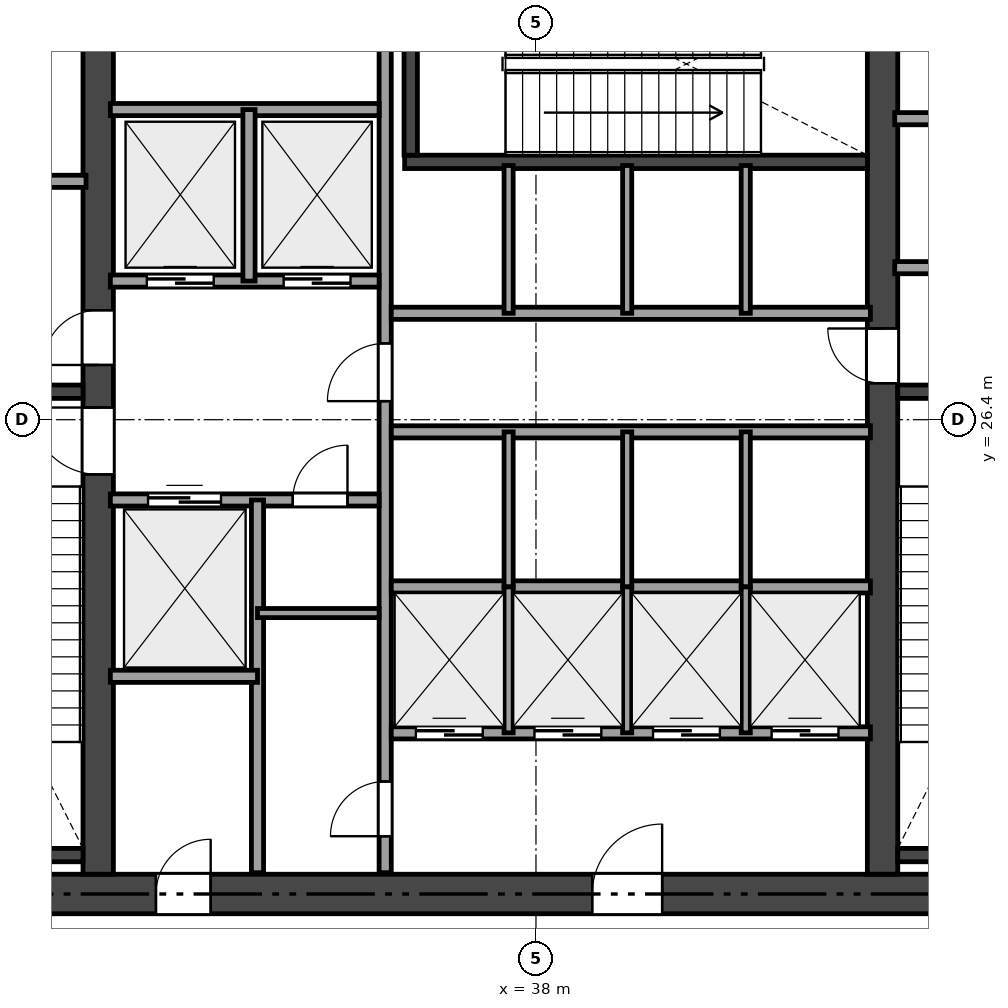
"""IFC4 building model, lengths in metres.
Left out: names, types, materials, properties, quantities, classifications, styles, units other than length and angle.
Written with IfcOpenShell. Run it as: python <this file> out.ifc"""

import sys

from ifc_helpers import new_model, si_unit, direction, frame, frame_2d, origin, place, context, subcontext, project, spatial, rectangle, extrude, element, fill, save


model = new_model("IFC4")
c1 = context("Model", 3, precision=1e-05, world=origin(), true_north=direction((0.0, 1.0)))
c2 = subcontext(c1, "Body", "Model", "MODEL_VIEW")
j1 = project(units=[si_unit("LENGTHUNIT", "METRE"), si_unit("PLANEANGLEUNIT", "RADIAN")], contexts=[c1])
p1 = place(None, origin())
s1 = spatial("IfcSite", under=j1, at=p1, CompositionType="ELEMENT")
p2 = place(p1, origin())
s2 = spatial("IfcBuilding", under=s1, at=p2, CompositionType="ELEMENT")
p3 = place(p2, frame((0.0, 0.0, 21.6)))
s3 = spatial("IfcBuildingStorey", under=s2, at=p3, CompositionType="ELEMENT", Elevation=21.6)
p4 = place(p3, frame((26.475, 18.6, 0.0), z_axis=(0.0, 0.0, 1.0), x_axis=(1.0, 0.0, 0.0)))
e1 = element("IfcWall", 1, at=p4, inside=s3, PredefinedType="SHEAR", context=c2, shape_type="SweptSolid", body=[
    extrude(rectangle(XDim=21.45, YDim=0.65, at=frame_2d((10.725, 0.0))), origin(), (0.0, 0.0, 1.0), 4.98),
])
p5 = place(p4, frame((12.45, 0.0, 0.0)))
e2 = element("IfcOpeningElement", 2, at=p5, cuts=e1, PredefinedType="OPENING", context=c2, shape_type="SweptSolid", body=[
    extrude(rectangle(XDim=1.15, YDim=2.15, at=frame_2d((0.575, 1.075))), frame((0.0, 0.335, 0.0), z_axis=(0.0, -1.0, 0.0), x_axis=(1.0, 0.0, 0.0)), (0.0, 0.0, 1.0), 0.67),
])
p6 = place(p4, frame((5.275, 0.0, 0.0)))
e3 = element("IfcOpeningElement", 3, at=p6, cuts=e1, PredefinedType="OPENING", context=c2, shape_type="SweptSolid", body=[
    extrude(rectangle(XDim=0.9, YDim=2.1, at=frame_2d((0.45, 1.05))), frame((0.0, 0.335, 0.0), z_axis=(0.0, -1.0, 0.0), x_axis=(1.0, 0.0, 0.0)), (0.0, 0.0, 1.0), 0.67),
])
p7 = place(p3, frame((30.8, 18.925, 0.0), z_axis=(0.0, 0.0, 1.0), x_axis=(0.0, 1.0, 0.0)))
e4 = element("IfcWall", 4, at=p7, inside=s3, PredefinedType="SHEAR", context=c2, shape_type="SweptSolid", body=[
    extrude(rectangle(XDim=14.95, YDim=0.5, at=frame_2d((7.475, 0.0))), origin(), (0.0, 0.0, 1.0), 4.98),
])
p8 = place(p7, frame((6.575, 0.0, 0.0)))
e5 = element("IfcOpeningElement", 5, at=p8, cuts=e4, PredefinedType="OPENING", context=c2, shape_type="SweptSolid", body=[
    extrude(rectangle(XDim=1.1, YDim=2.15, at=frame_2d((0.55, 1.075))), frame((0.0, 0.26, 0.0), z_axis=(0.0, -1.0, 0.0), x_axis=(1.0, 0.0, 0.0)), (0.0, 0.0, 1.0), 0.52),
])
p9 = place(p7, frame((8.375, 0.0, 0.0)))
e6 = element("IfcOpeningElement", 6, at=p9, cuts=e4, PredefinedType="OPENING", context=c2, shape_type="SweptSolid", body=[
    extrude(rectangle(XDim=0.9, YDim=2.1, at=frame_2d((0.45, 1.05))), frame((0.0, 0.26, 0.0), z_axis=(0.0, -1.0, 0.0), x_axis=(1.0, 0.0, 0.0)), (0.0, 0.0, 1.0), 0.52),
])
p10 = place(p3, frame((43.7, 18.925, 0.0), z_axis=(0.0, 0.0, 1.0), x_axis=(0.0, 1.0, 0.0)))
e7 = element("IfcWall", 7, at=p10, inside=s3, PredefinedType="SHEAR", context=c2, shape_type="SweptSolid", body=[
    extrude(rectangle(XDim=14.95, YDim=0.5, at=frame_2d((7.475, 0.0))), origin(), (0.0, 0.0, 1.0), 4.98),
])
p11 = place(p10, frame((8.075, 0.0, 0.0)))
e8 = element("IfcOpeningElement", 8, at=p11, cuts=e7, PredefinedType="OPENING", context=c2, shape_type="SweptSolid", body=[
    extrude(rectangle(XDim=0.9, YDim=2.1, at=frame_2d((0.45, 1.05))), frame((0.0, 0.26, 0.0), z_axis=(0.0, -1.0, 0.0), x_axis=(1.0, 0.0, 0.0)), (0.0, 0.0, 1.0), 0.52),
])
for number, where, z_axis, x_axis in (
    (9, (27.125, 26.86, 0.0), (0.0, 0.0, 1.0), (1.0, 0.0, 0.0)),
    (10, (27.125, 19.24, 0.0), (0.0, 0.0, 1.0), (1.0, 0.0, 0.0)),
):
    element("IfcWall", number, at=place(p3, frame(where, z_axis=z_axis, x_axis=x_axis)), inside=s3, PredefinedType="SHEAR", context=c2, shape_type="SweptSolid", body=[
        extrude(rectangle(XDim=3.425, YDim=0.22, at=frame_2d((1.712, 0.0))), origin(), (0.0, 0.0, 1.0), 4.98),
    ])
for number, where, z_axis, x_axis in (
    (11, (43.95, 26.86, 0.0), (0.0, 0.0, 1.0), (1.0, 0.0, 0.0)),
    (12, (43.95, 19.24, 0.0), (0.0, 0.0, 1.0), (1.0, 0.0, 0.0)),
):
    element("IfcWall", number, at=place(p3, frame(where, z_axis=z_axis, x_axis=x_axis)), inside=s3, PredefinedType="SHEAR", context=c2, shape_type="SweptSolid", body=[
        extrude(rectangle(XDim=3.325, YDim=0.22, at=frame_2d((1.663, 0.0))), origin(), (0.0, 0.0, 1.0), 4.98),
    ])
p12 = place(p3, frame((35.84, 30.64, 0.0), z_axis=(0.0, 0.0, 1.0), x_axis=(1.0, 0.0, 0.0)))
e13 = element("IfcWall", 13, at=p12, inside=s3, PredefinedType="SHEAR", context=c2, shape_type="SweptSolid", body=[
    extrude(rectangle(XDim=7.61, YDim=0.22, at=frame_2d((3.805, 0.0))), origin(), (0.0, 0.0, 1.0), 4.98),
])
p13 = place(p3, frame((35.94, 30.75, 0.0), z_axis=(0.0, 0.0, 1.0), x_axis=(0.0, 1.0, 0.0)))
e14 = element("IfcWall", 14, at=p13, inside=s3, PredefinedType="SHEAR", context=c2, shape_type="SweptSolid", body=[
    extrude(rectangle(XDim=3.125, YDim=0.22, at=frame_2d((1.562, 0.0))), origin(), (0.0, 0.0, 1.0), 4.98),
])
p14 = place(p3, frame((27.15, 30.32, 0.0), z_axis=(0.0, 0.0, 1.0), x_axis=(1.0, 0.0, 0.0)))
e15 = element("IfcWall", 15, at=p14, inside=s3, PredefinedType="SOLIDWALL", context=c2, shape_type="SweptSolid", body=[
    extrude(rectangle(XDim=3.45, YDim=0.2, at=frame_2d((1.725, 0.0))), origin(), (0.0, 0.0, 1.0), 4.98),
])
p15 = place(p3, frame((43.9, 28.9, 0.0), z_axis=(0.0, 0.0, 1.0), x_axis=(1.0, 0.0, 0.0)))
e16 = element("IfcWall", 16, at=p15, inside=s3, PredefinedType="SOLIDWALL", context=c2, shape_type="SweptSolid", body=[
    extrude(rectangle(XDim=3.35, YDim=0.2, at=frame_2d((1.675, 0.0))), origin(), (0.0, 0.0, 1.0), 4.98),
])
p16 = place(p15, frame((1.15, 0.0, 0.0)))
e17 = element("IfcOpeningElement", 17, at=p16, cuts=e16, PredefinedType="OPENING", context=c2, shape_type="SweptSolid", body=[
    extrude(rectangle(XDim=0.9, YDim=2.1, at=frame_2d((0.45, 1.05))), frame((0.0, 0.11, 0.0), z_axis=(0.0, -1.0, 0.0), x_axis=(1.0, 0.0, 0.0)), (0.0, 0.0, 1.0), 0.22),
])
p17 = place(p3, frame((43.9, 31.35, 0.0), z_axis=(0.0, 0.0, 1.0), x_axis=(1.0, 0.0, 0.0)))
e18 = element("IfcWall", 18, at=p17, inside=s3, PredefinedType="SOLIDWALL", context=c2, shape_type="SweptSolid", body=[
    extrude(rectangle(XDim=3.35, YDim=0.2, at=frame_2d((1.675, 0.0))), origin(), (0.0, 0.0, 1.0), 4.98),
])
p18 = place(p3, frame((35.52, 18.95, 0.0), z_axis=(0.0, 0.0, 1.0), x_axis=(0.0, 1.0, 0.0)))
e19 = element("IfcWall", 19, at=p18, inside=s3, PredefinedType="SOLIDWALL", context=c2, shape_type="SweptSolid", body=[
    extrude(rectangle(XDim=14.9, YDim=0.2, at=frame_2d((7.45, 0.0))), origin(), (0.0, 0.0, 1.0), 4.501),
])
p19 = place(p18, frame((7.755, 0.0, 0.0)))
e20 = element("IfcOpeningElement", 20, at=p19, cuts=e19, PredefinedType="OPENING", context=c2, shape_type="SweptSolid", body=[
    extrude(rectangle(XDim=0.95, YDim=2.15, at=frame_2d((0.475, 1.075))), frame((0.0, 0.11, 0.0), z_axis=(0.0, -1.0, 0.0), x_axis=(1.0, 0.0, 0.0)), (0.0, 0.0, 1.0), 0.22),
])
p20 = place(p18, frame((0.6, 0.0, 0.0)))
e21 = element("IfcOpeningElement", 21, at=p20, cuts=e19, PredefinedType="OPENING", context=c2, shape_type="SweptSolid", body=[
    extrude(rectangle(XDim=0.9, YDim=2.1, at=frame_2d((0.45, 1.05))), frame((0.0, 0.11, 0.0), z_axis=(0.0, -1.0, 0.0), x_axis=(1.0, 0.0, 0.0)), (0.0, 0.0, 1.0), 0.22),
])
p21 = place(p3, frame((31.0, 28.68, 0.0), z_axis=(0.0, 0.0, 1.0), x_axis=(1.0, 0.0, 0.0)))
e22 = element("IfcWall", 22, at=p21, inside=s3, PredefinedType="SOLIDWALL", context=c2, shape_type="SweptSolid", body=[
    extrude(rectangle(XDim=4.42, YDim=0.2, at=frame_2d((2.21, 0.0))), origin(), (0.0, 0.0, 1.0), 4.98),
])
p22 = place(p21, frame((0.6, 0.0, 0.0)))
e23 = element("IfcOpeningElement", 23, at=p22, cuts=e22, PredefinedType="OPENING", context=c2, shape_type="SweptSolid", body=[
    extrude(rectangle(XDim=1.1, YDim=2.15, at=frame_2d((0.55, 1.075))), frame((0.0, 0.11, 0.0), z_axis=(0.0, -1.0, 0.0), x_axis=(1.0, 0.0, 0.0)), (0.0, 0.0, 1.0), 0.22),
])
p23 = place(p21, frame((2.85, 0.0, 0.0)))
e24 = element("IfcOpeningElement", 24, at=p23, cuts=e22, PredefinedType="OPENING", context=c2, shape_type="SweptSolid", body=[
    extrude(rectangle(XDim=1.1, YDim=2.15, at=frame_2d((0.55, 1.075))), frame((0.0, 0.11, 0.0), z_axis=(0.0, -1.0, 0.0), x_axis=(1.0, 0.0, 0.0)), (0.0, 0.0, 1.0), 0.22),
])
p24 = place(p3, frame((31.0, 31.5, 0.0), z_axis=(0.0, 0.0, 1.0), x_axis=(1.0, 0.0, 0.0)))
e25 = element("IfcWall", 25, at=p24, inside=s3, PredefinedType="SOLIDWALL", context=c2, shape_type="SweptSolid", body=[
    extrude(rectangle(XDim=4.42, YDim=0.2, at=frame_2d((2.21, 0.0))), origin(), (0.0, 0.0, 1.0), 4.98),
])
p25 = place(p3, frame((33.28, 28.68, 0.0), z_axis=(0.0, 0.0, 1.0), x_axis=(0.0, 1.0, 0.0)))
e26 = element("IfcWall", 26, at=p25, inside=s3, PredefinedType="SOLIDWALL", context=c2, shape_type="SweptSolid", body=[
    extrude(rectangle(XDim=2.82, YDim=0.2, at=frame_2d((1.41, 0.0))), origin(), (0.0, 0.0, 1.0), 4.98),
])
p26 = place(p3, frame((31.0, 25.08, 0.0), z_axis=(0.0, 0.0, 1.0), x_axis=(1.0, 0.0, 0.0)))
e27 = element("IfcWall", 27, at=p26, inside=s3, PredefinedType="SOLIDWALL", context=c2, shape_type="SweptSolid", body=[
    extrude(rectangle(XDim=4.42, YDim=0.2, at=frame_2d((2.21, 0.0))), origin(), (0.0, 0.0, 1.0), 4.98),
])
p27 = place(p26, frame((3.0, 0.0, 0.0)))
e28 = element("IfcOpeningElement", 28, at=p27, cuts=e27, PredefinedType="OPENING", context=c2, shape_type="SweptSolid", body=[
    extrude(rectangle(XDim=0.9, YDim=2.1, at=frame_2d((0.45, 1.05))), frame((0.0, 0.11, 0.0), z_axis=(0.0, -1.0, 0.0), x_axis=(1.0, 0.0, 0.0)), (0.0, 0.0, 1.0), 0.22),
])
p28 = place(p26, frame((0.62, 0.0, 0.0)))
e29 = element("IfcOpeningElement", 29, at=p28, cuts=e27, PredefinedType="OPENING", context=c2, shape_type="SweptSolid", body=[
    extrude(rectangle(XDim=1.2, YDim=2.15, at=frame_2d((0.6, 1.075))), frame((0.0, 0.11, 0.0), z_axis=(0.0, -1.0, 0.0), x_axis=(1.0, 0.0, 0.0)), (0.0, 0.0, 1.0), 0.22),
])
p29 = place(p3, frame((33.42, 18.95, 0.0), z_axis=(0.0, 0.0, 1.0), x_axis=(0.0, 1.0, 0.0)))
e30 = element("IfcWall", 30, at=p29, inside=s3, PredefinedType="SOLIDWALL", context=c2, shape_type="SweptSolid", body=[
    extrude(rectangle(XDim=6.13, YDim=0.2, at=frame_2d((3.065, 0.0))), origin(), (0.0, 0.0, 1.0), 4.501),
])
p30 = place(p3, frame((31.0, 22.18, 0.0), z_axis=(0.0, 0.0, 1.0), x_axis=(1.0, 0.0, 0.0)))
e31 = element("IfcWall", 31, at=p30, inside=s3, PredefinedType="SOLIDWALL", context=c2, shape_type="SweptSolid", body=[
    extrude(rectangle(XDim=2.42, YDim=0.2, at=frame_2d((1.21, 0.0))), origin(), (0.0, 0.0, 1.0), 4.98),
])
p31 = place(p3, frame((33.42, 23.22, 0.0), z_axis=(0.0, 0.0, 1.0), x_axis=(1.0, 0.0, 0.0)))
e32 = element("IfcWall", 32, at=p31, inside=s3, PredefinedType="PARTITIONING", context=c2, shape_type="SweptSolid", body=[
    extrude(rectangle(XDim=2.0, YDim=0.15, at=frame_2d((1.0, 0.0))), origin(), (0.0, 0.0, 1.0), 4.98),
])
for number, where, z_axis, x_axis in (
    (33, (35.62, 28.15, 0.0), (0.0, 0.0, 1.0), (1.0, 0.0, 0.0)),
    (34, (35.62, 26.2, 0.0), (0.0, 0.0, 1.0), (1.0, 0.0, 0.0)),
):
    element("IfcWall", number, at=place(p3, frame(where, z_axis=z_axis, x_axis=x_axis)), inside=s3, PredefinedType="SOLIDWALL", context=c2, shape_type="SweptSolid", body=[
        extrude(rectangle(XDim=7.88, YDim=0.2, at=frame_2d((3.94, 0.0))), origin(), (0.0, 0.0, 1.0), 4.98),
    ])
p32 = place(p3, frame((35.62, 23.65, 0.0), z_axis=(0.0, 0.0, 1.0), x_axis=(1.0, 0.0, 0.0)))
e35 = element("IfcWall", 35, at=p32, inside=s3, PredefinedType="SOLIDWALL", context=c2, shape_type="SweptSolid", body=[
    extrude(rectangle(XDim=7.88, YDim=0.2, at=frame_2d((3.94, 0.0))), origin(), (0.0, 0.0, 1.0), 4.501),
])
p33 = place(p3, frame((35.62, 21.25, 0.0), z_axis=(0.0, 0.0, 1.0), x_axis=(1.0, 0.0, 0.0)))
e36 = element("IfcWall", 36, at=p33, inside=s3, PredefinedType="SOLIDWALL", context=c2, shape_type="SweptSolid", body=[
    extrude(rectangle(XDim=7.88, YDim=0.2, at=frame_2d((3.94, 0.0))), origin(), (0.0, 0.0, 1.0), 4.98),
])
p34 = place(p33, frame((0.405, 0.0, 0.0)))
e37 = element("IfcOpeningElement", 37, at=p34, cuts=e36, PredefinedType="OPENING", context=c2, shape_type="SweptSolid", body=[
    extrude(rectangle(XDim=1.1, YDim=2.15, at=frame_2d((0.55, 1.075))), frame((0.0, 0.11, 0.0), z_axis=(0.0, -1.0, 0.0), x_axis=(1.0, 0.0, 0.0)), (0.0, 0.0, 1.0), 0.22),
])
p35 = place(p33, frame((2.355, 0.0, 0.0)))
e38 = element("IfcOpeningElement", 38, at=p35, cuts=e36, PredefinedType="OPENING", context=c2, shape_type="SweptSolid", body=[
    extrude(rectangle(XDim=1.1, YDim=2.15, at=frame_2d((0.55, 1.075))), frame((0.0, 0.11, 0.0), z_axis=(0.0, -1.0, 0.0), x_axis=(1.0, 0.0, 0.0)), (0.0, 0.0, 1.0), 0.22),
])
p36 = place(p33, frame((4.305, 0.0, 0.0)))
e39 = element("IfcOpeningElement", 39, at=p36, cuts=e36, PredefinedType="OPENING", context=c2, shape_type="SweptSolid", body=[
    extrude(rectangle(XDim=1.1, YDim=2.15, at=frame_2d((0.55, 1.075))), frame((0.0, 0.11, 0.0), z_axis=(0.0, -1.0, 0.0), x_axis=(1.0, 0.0, 0.0)), (0.0, 0.0, 1.0), 0.22),
])
p37 = place(p33, frame((6.255, 0.0, 0.0)))
e40 = element("IfcOpeningElement", 40, at=p37, cuts=e36, PredefinedType="OPENING", context=c2, shape_type="SweptSolid", body=[
    extrude(rectangle(XDim=1.1, YDim=2.15, at=frame_2d((0.55, 1.075))), frame((0.0, 0.11, 0.0), z_axis=(0.0, -1.0, 0.0), x_axis=(1.0, 0.0, 0.0)), (0.0, 0.0, 1.0), 0.22),
])
for number, where, z_axis, x_axis in (
    (41, (37.55, 28.15, 0.0), (0.0, 0.0, 1.0), (0.0, 1.0, 0.0)),
    (42, (39.5, 28.15, 0.0), (0.0, 0.0, 1.0), (0.0, 1.0, 0.0)),
    (43, (41.45, 28.15, 0.0), (0.0, 0.0, 1.0), (0.0, 1.0, 0.0)),
):
    element("IfcWall", number, at=place(p3, frame(where, z_axis=z_axis, x_axis=x_axis)), inside=s3, PredefinedType="PARTITIONING", context=c2, shape_type="SweptSolid", body=[
        extrude(rectangle(XDim=2.43, YDim=0.15, at=frame_2d((1.215, 0.0))), origin(), (0.0, 0.0, 1.0), 4.98),
    ])
for number, where, z_axis, x_axis in (
    (44, (37.55, 23.65, 0.0), (0.0, 0.0, 1.0), (0.0, 1.0, 0.0)),
    (45, (39.5, 23.65, 0.0), (0.0, 0.0, 1.0), (0.0, 1.0, 0.0)),
    (46, (41.45, 23.65, 0.0), (0.0, 0.0, 1.0), (0.0, 1.0, 0.0)),
):
    element("IfcWall", number, at=place(p3, frame(where, z_axis=z_axis, x_axis=x_axis)), inside=s3, PredefinedType="PARTITIONING", context=c2, shape_type="SweptSolid", body=[
        extrude(rectangle(XDim=2.55, YDim=0.15, at=frame_2d((1.275, 0.0))), origin(), (0.0, 0.0, 1.0), 4.501),
    ])
for number, where, z_axis, x_axis in (
    (47, (37.55, 21.25, 0.0), (0.0, 0.0, 1.0), (0.0, 1.0, 0.0)),
    (48, (39.5, 21.25, 0.0), (0.0, 0.0, 1.0), (0.0, 1.0, 0.0)),
    (49, (41.45, 21.25, 0.0), (0.0, 0.0, 1.0), (0.0, 1.0, 0.0)),
):
    element("IfcWall", number, at=place(p3, frame(where, z_axis=z_axis, x_axis=x_axis)), inside=s3, PredefinedType="PARTITIONING", context=c2, shape_type="SweptSolid", body=[
        extrude(rectangle(XDim=2.4, YDim=0.15, at=frame_2d((1.2, 0.0))), origin(), (0.0, 0.0, 1.0), 4.501),
    ])
p38 = place(p8, origin())
e50 = element("IfcDoor", 50, at=p38, inside=s3, OperationType="SINGLE_SWING_RIGHT", PredefinedType="DOOR", context=c2, shape_type="SweptSolid", body=[
    extrude(rectangle(XDim=1.1, YDim=2.15, at=frame_2d((0.55, 1.075))), frame((0.0, 0.025, 0.0), z_axis=(0.0, -1.0, 0.0), x_axis=(1.0, 0.0, 0.0)), (0.0, 0.0, 1.0), 0.05),
])
fill(e5, e50)
p39 = place(p19, origin())
e51 = element("IfcDoor", 51, at=p39, inside=s3, OperationType="SINGLE_SWING_LEFT", PredefinedType="DOOR", context=c2, shape_type="SweptSolid", body=[
    extrude(rectangle(XDim=0.95, YDim=2.15, at=frame_2d((0.475, 1.075))), frame((0.0, 0.025, 0.0), z_axis=(0.0, -1.0, 0.0), x_axis=(1.0, 0.0, 0.0)), (0.0, 0.0, 1.0), 0.05),
])
fill(e20, e51)
p40 = place(p11, origin())
e52 = element("IfcDoor", 52, at=p40, inside=s3, OperationType="SINGLE_SWING_RIGHT", PredefinedType="DOOR", context=c2, shape_type="SweptSolid", body=[
    extrude(rectangle(XDim=0.9, YDim=2.1, at=frame_2d((0.45, 1.05))), frame((0.0, 0.025, 0.0), z_axis=(0.0, -1.0, 0.0), x_axis=(1.0, 0.0, 0.0)), (0.0, 0.0, 1.0), 0.05),
])
fill(e8, e52)
p41 = place(p5, origin())
e53 = element("IfcDoor", 53, at=p41, inside=s3, OperationType="SINGLE_SWING_RIGHT", PredefinedType="DOOR", context=c2, shape_type="SweptSolid", body=[
    extrude(rectangle(XDim=1.15, YDim=2.15, at=frame_2d((0.575, 1.075))), frame((0.0, 0.025, 0.0), z_axis=(0.0, -1.0, 0.0), x_axis=(1.0, 0.0, 0.0)), (0.0, 0.0, 1.0), 0.05),
])
fill(e2, e53)
p42 = place(p9, origin())
e54 = element("IfcDoor", 54, at=p42, inside=s3, OperationType="SINGLE_SWING_LEFT", PredefinedType="DOOR", context=c2, shape_type="SweptSolid", body=[
    extrude(rectangle(XDim=0.9, YDim=2.1, at=frame_2d((0.45, 1.05))), frame((0.0, 0.025, 0.0), z_axis=(0.0, -1.0, 0.0), x_axis=(1.0, 0.0, 0.0)), (0.0, 0.0, 1.0), 0.05),
])
fill(e6, e54)
p43 = place(p6, origin())
e55 = element("IfcDoor", 55, at=p43, inside=s3, OperationType="SINGLE_SWING_RIGHT", PredefinedType="DOOR", context=c2, shape_type="SweptSolid", body=[
    extrude(rectangle(XDim=0.9, YDim=2.1, at=frame_2d((0.45, 1.05))), frame((0.0, 0.025, 0.0), z_axis=(0.0, -1.0, 0.0), x_axis=(1.0, 0.0, 0.0)), (0.0, 0.0, 1.0), 0.05),
])
fill(e3, e55)
p44 = place(p20, origin())
e56 = element("IfcDoor", 56, at=p44, inside=s3, OperationType="SINGLE_SWING_LEFT", PredefinedType="DOOR", context=c2, shape_type="SweptSolid", body=[
    extrude(rectangle(XDim=0.9, YDim=2.1, at=frame_2d((0.45, 1.05))), frame((0.0, 0.025, 0.0), z_axis=(0.0, -1.0, 0.0), x_axis=(1.0, 0.0, 0.0)), (0.0, 0.0, 1.0), 0.05),
])
fill(e21, e56)
p45 = place(p27, origin())
e57 = element("IfcDoor", 57, at=p45, inside=s3, OperationType="SINGLE_SWING_RIGHT", PredefinedType="DOOR", context=c2, shape_type="SweptSolid", body=[
    extrude(rectangle(XDim=0.9, YDim=2.1, at=frame_2d((0.45, 1.05))), frame((0.0, 0.025, 0.0), z_axis=(0.0, -1.0, 0.0), x_axis=(1.0, 0.0, 0.0)), (0.0, 0.0, 1.0), 0.05),
])
fill(e28, e57)
p46 = place(p22, origin())
e58 = element("IfcDoor", 58, at=p46, inside=s3, OperationType="SLIDING_TO_LEFT", PredefinedType="DOOR", context=c2, shape_type="SweptSolid", body=[
    extrude(rectangle(XDim=1.1, YDim=2.15, at=frame_2d((0.55, 1.075))), frame((0.0, 0.025, 0.0), z_axis=(0.0, -1.0, 0.0), x_axis=(1.0, 0.0, 0.0)), (0.0, 0.0, 1.0), 0.05),
])
fill(e23, e58)
p47 = place(p23, origin())
e59 = element("IfcDoor", 59, at=p47, inside=s3, OperationType="SLIDING_TO_LEFT", PredefinedType="DOOR", context=c2, shape_type="SweptSolid", body=[
    extrude(rectangle(XDim=1.1, YDim=2.15, at=frame_2d((0.55, 1.075))), frame((0.0, 0.025, 0.0), z_axis=(0.0, -1.0, 0.0), x_axis=(1.0, 0.0, 0.0)), (0.0, 0.0, 1.0), 0.05),
])
fill(e24, e59)
p48 = place(p28, origin())
e60 = element("IfcDoor", 60, at=p48, inside=s3, OperationType="SLIDING_TO_LEFT", PredefinedType="DOOR", context=c2, shape_type="SweptSolid", body=[
    extrude(rectangle(XDim=1.2, YDim=2.15, at=frame_2d((0.6, 1.075))), frame((0.0, 0.025, 0.0), z_axis=(0.0, -1.0, 0.0), x_axis=(1.0, 0.0, 0.0)), (0.0, 0.0, 1.0), 0.05),
])
fill(e29, e60)
p49 = place(p34, origin())
e61 = element("IfcDoor", 61, at=p49, inside=s3, OperationType="SLIDING_TO_LEFT", PredefinedType="DOOR", context=c2, shape_type="SweptSolid", body=[
    extrude(rectangle(XDim=1.1, YDim=2.15, at=frame_2d((0.55, 1.075))), frame((0.0, 0.025, 0.0), z_axis=(0.0, -1.0, 0.0), x_axis=(1.0, 0.0, 0.0)), (0.0, 0.0, 1.0), 0.05),
])
fill(e37, e61)
p50 = place(p35, origin())
e62 = element("IfcDoor", 62, at=p50, inside=s3, OperationType="SLIDING_TO_LEFT", PredefinedType="DOOR", context=c2, shape_type="SweptSolid", body=[
    extrude(rectangle(XDim=1.1, YDim=2.15, at=frame_2d((0.55, 1.075))), frame((0.0, 0.025, 0.0), z_axis=(0.0, -1.0, 0.0), x_axis=(1.0, 0.0, 0.0)), (0.0, 0.0, 1.0), 0.05),
])
fill(e38, e62)
p51 = place(p36, origin())
e63 = element("IfcDoor", 63, at=p51, inside=s3, OperationType="SLIDING_TO_LEFT", PredefinedType="DOOR", context=c2, shape_type="SweptSolid", body=[
    extrude(rectangle(XDim=1.1, YDim=2.15, at=frame_2d((0.55, 1.075))), frame((0.0, 0.025, 0.0), z_axis=(0.0, -1.0, 0.0), x_axis=(1.0, 0.0, 0.0)), (0.0, 0.0, 1.0), 0.05),
])
fill(e39, e63)
p52 = place(p37, origin())
e64 = element("IfcDoor", 64, at=p52, inside=s3, OperationType="SLIDING_TO_LEFT", PredefinedType="DOOR", context=c2, shape_type="SweptSolid", body=[
    extrude(rectangle(XDim=1.1, YDim=2.15, at=frame_2d((0.55, 1.075))), frame((0.0, 0.025, 0.0), z_axis=(0.0, -1.0, 0.0), x_axis=(1.0, 0.0, 0.0)), (0.0, 0.0, 1.0), 0.05),
])
fill(e40, e64)
save(model, sys.argv[1])
